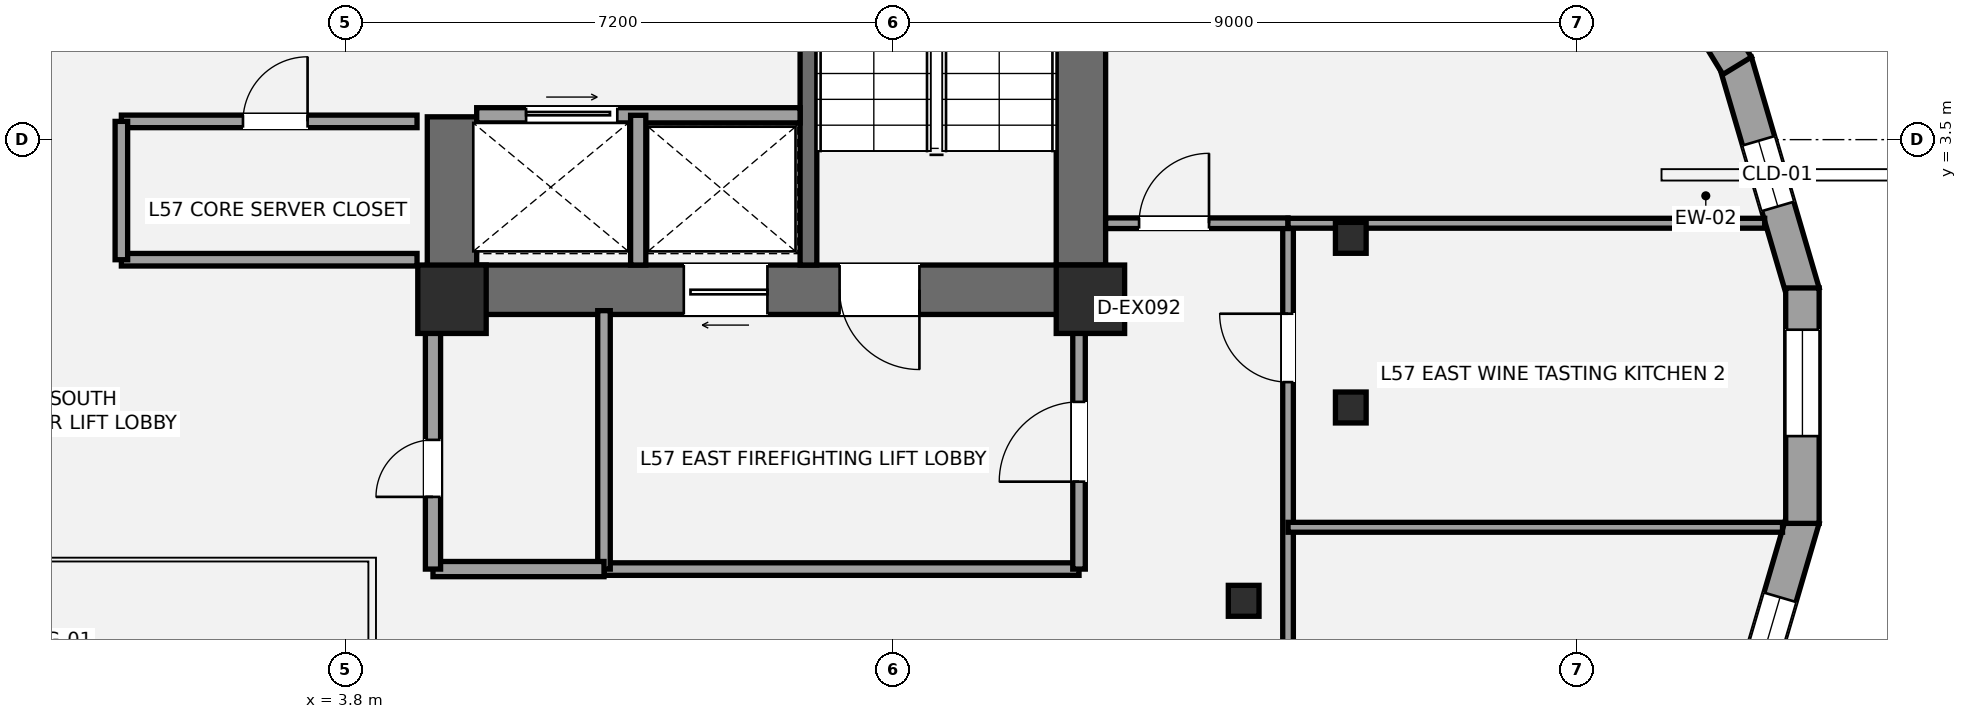
"""IFC4 building model, lengths in metres.
Left out: names, types, materials, properties, quantities, classifications, styles, units other than length and angle.
Written with IfcOpenShell. Run it as: python <this file> out.ifc"""

import sys

from ifc_helpers import new_model, si_unit, direction, frame, frame_2d, origin, origin_2d, place, context, subcontext, project, spatial, rectangle, i_section, extrude, element, fill, save


model = new_model("IFC4")
c1 = context("Model", 3, precision=1e-05, world=origin(), true_north=direction((0.0, 1.0)))
c2 = subcontext(c1, "Body", "Model", "MODEL_VIEW")
j1 = project(units=[si_unit("LENGTHUNIT", "METRE"), si_unit("PLANEANGLEUNIT", "RADIAN")], contexts=[c1])
p1 = place(None, origin())
s1 = spatial("IfcSite", under=j1, at=p1, CompositionType="ELEMENT")
p2 = place(p1, origin())
s2 = spatial("IfcBuilding", under=s1, at=p2, CompositionType="ELEMENT")
p3 = place(p2, frame((0.0, 0.0, 205.9)))
s3 = spatial("IfcBuildingStorey", under=s2, at=p3, CompositionType="ELEMENT", Elevation=205.9)
p4 = place(p3, frame((13.475, 1.2, 0.0), z_axis=(0.0, 0.0, 1.0), x_axis=(0.0, 1.0, 0.0)))
e1 = element("IfcWall", 1, at=p4, inside=s3, PredefinedType="SHEAR", context=c2, shape_type="SweptSolid", body=[
    extrude(rectangle(XDim=8.45, YDim=0.65, at=frame_2d((4.225, 0.0))), origin(), (0.0, 0.0, 1.0), 4.1),
])
p5 = place(p3, frame((13.8, 1.525, 0.0), z_axis=(0.0, 0.0, 1.0), x_axis=(-1.0, 0.0, 0.0)))
e2 = element("IfcWall", 2, at=p5, inside=s3, PredefinedType="SHEAR", context=c2, shape_type="SweptSolid", body=[
    extrude(rectangle(XDim=8.925, YDim=0.65, at=frame_2d((4.462, 0.0))), origin(), (0.0, 0.0, 1.0), 4.1),
])
p6 = place(p5, frame((2.45, 0.0, 0.0)))
e3 = element("IfcOpeningElement", 3, at=p6, cuts=e2, PredefinedType="OPENING", context=c2, shape_type="SweptSolid", body=[
    extrude(rectangle(XDim=1.05, YDim=2.15, at=frame_2d((0.525, 1.075))), frame((0.0, 0.335, 0.0), z_axis=(0.0, -1.0, 0.0), x_axis=(1.0, 0.0, 0.0)), (0.0, 0.0, 1.0), 0.67),
])
p7 = place(p5, frame((4.45, 0.0, 0.0)))
e4 = element("IfcOpeningElement", 4, at=p7, cuts=e2, PredefinedType="OPENING", context=c2, shape_type="SweptSolid", body=[
    extrude(rectangle(XDim=1.1, YDim=2.2, at=frame_2d((0.55, 1.1))), frame((0.0, 0.335, 0.0), z_axis=(0.0, -1.0, 0.0), x_axis=(1.0, 0.0, 0.0)), (0.0, 0.0, 1.0), 0.67),
])
p8 = place(p3, frame((5.2, 1.2, 0.0), z_axis=(0.0, 0.0, 1.0), x_axis=(0.0, 1.0, 0.0)))
e5 = element("IfcWall", 5, at=p8, inside=s3, PredefinedType="SHEAR", context=c2, shape_type="SweptSolid", body=[
    extrude(rectangle(XDim=2.6, YDim=0.65, at=frame_2d((1.3, 0.0))), origin(), (0.0, 0.0, 1.0), 4.1),
])
p9 = place(p3, frame((9.89, 1.85, 0.0), z_axis=(0.0, 0.0, 1.0), x_axis=(0.0, 1.0, 0.0)))
e6 = element("IfcWall", 6, at=p9, inside=s3, PredefinedType="SHEAR", context=c2, shape_type="SweptSolid", body=[
    extrude(rectangle(XDim=7.15, YDim=0.22, at=frame_2d((3.575, 0.0))), origin(), (0.0, 0.0, 1.0), 4.1),
])
for number, where, z_axis, x_axis in (
    (7, (5.2, 1.4, 0.0), (0.0, 0.0, 1.0), (1.0, 0.0, 0.0)),
    (8, (13.6, 1.4, 0.0), (0.0, 0.0, 1.0), (1.0, 0.0, 0.0)),
):
    element("IfcColumn", number, at=place(p3, frame(where, z_axis=z_axis, x_axis=x_axis)), inside=s3, PredefinedType="COLUMN", context=c2, shape_type="SweptSolid", body=[
        extrude(rectangle(XDim=0.9, YDim=0.9, at=origin_2d()), origin(), (0.0, 0.0, 1.0), 4.1),
    ])
for number, where, z_axis, x_axis in (
    (9, (17.026, 2.208, 0.0), (0.0, 0.0, 1.0), (1.0, 0.0, 0.0)),
    (10, (15.616, -2.567, 0.0), (0.0, 0.0, 1.0), (1.0, 0.0, 0.0)),
    (11, (17.026, -0.024, 0.0), (0.0, 0.0, 1.0), (1.0, 0.0, 0.0)),
):
    element("IfcColumn", number, at=place(p3, frame(where, z_axis=z_axis, x_axis=x_axis)), inside=s3, PredefinedType="COLUMN", context=c2, shape_type="SweptSolid", body=[
        extrude(i_section(OverallWidth=0.404, OverallDepth=0.407, WebThickness=0.027, FlangeThickness=0.044, at=origin_2d()), origin(), (0.0, 0.0, 1.0), 4.1),
    ])
p10 = place(p3, frame((22.086, 4.525, 0.0), z_axis=(0.0, 0.0, 1.0), x_axis=(0.281477355005, -0.959567870773, 0.0)))
e12 = element("IfcWall", 12, at=p10, inside=s3, PredefinedType="STANDARD", context=c2, shape_type="SweptSolid", body=[
    extrude(rectangle(XDim=3.166, YDim=0.44, at=frame_2d((1.583, 0.0))), origin(), (0.0, 0.0, 1.0), 3.215),
])
p11 = place(p10, frame((1.084, 0.0, 0.42)))
e13 = element("IfcOpeningElement", 13, at=p11, cuts=e12, PredefinedType="OPENING", context=c2, shape_type="SweptSolid", body=[
    extrude(rectangle(XDim=0.9, YDim=1.35, at=frame_2d((0.45, 0.675))), frame((0.0, 0.23, 0.0), z_axis=(0.0, -1.0, 0.0), x_axis=(1.0, 0.0, 0.0)), (0.0, 0.0, 1.0), 0.46),
])
p12 = place(p3, frame((20.361, 7.333, 0.0), z_axis=(0.0, 0.0, 1.0), x_axis=(0.521214394333, -0.853425775999, 0.0)))
e14 = element("IfcWall", 14, at=p12, inside=s3, PredefinedType="STANDARD", context=c2, shape_type="SweptSolid", body=[
    extrude(rectangle(XDim=3.353, YDim=0.44, at=frame_2d((1.677, 0.0))), origin(), (0.0, 0.0, 1.0), 3.215),
])
p13 = place(p12, frame((0.734, 0.0, 0.58)))
e15 = element("IfcOpeningElement", 15, at=p13, cuts=e14, PredefinedType="OPENING", context=c2, shape_type="SweptSolid", body=[
    extrude(rectangle(XDim=1.4, YDim=1.55, at=frame_2d((0.7, 0.775))), frame((0.0, 0.23, 0.0), z_axis=(0.0, -1.0, 0.0), x_axis=(1.0, 0.0, 0.0)), (0.0, 0.0, 1.0), 0.46),
])
p14 = place(p3, frame((22.977, -1.487, 0.0), z_axis=(0.0, 0.0, 1.0), x_axis=(-0.281477355005, -0.959567870773, 0.0)))
e16 = element("IfcWall", 16, at=p14, inside=s3, PredefinedType="STANDARD", context=c2, shape_type="SweptSolid", body=[
    extrude(rectangle(XDim=3.166, YDim=0.44, at=frame_2d((1.583, 0.0))), origin(), (0.0, 0.0, 1.0), 3.215),
])
p15 = place(p14, frame((1.078, 0.0, 0.58)))
e17 = element("IfcOpeningElement", 17, at=p15, cuts=e16, PredefinedType="OPENING", context=c2, shape_type="SweptSolid", body=[
    extrude(rectangle(XDim=1.4, YDim=1.55, at=frame_2d((0.7, 0.775))), frame((0.0, 0.23, 0.0), z_axis=(0.0, -1.0, 0.0), x_axis=(1.0, 0.0, 0.0)), (0.0, 0.0, 1.0), 0.46),
])
p16 = place(p3, frame((22.968, 1.549, 0.0), z_axis=(0.0, 0.0, 1.0), x_axis=(0.0, -1.0, 0.0)))
e18 = element("IfcWall", 18, at=p16, inside=s3, PredefinedType="STANDARD", context=c2, shape_type="SweptSolid", body=[
    extrude(rectangle(XDim=3.097, YDim=0.44, at=frame_2d((1.549, 0.0))), origin(), (0.0, 0.0, 1.0), 3.219),
])
p17 = place(p16, frame((0.549, 0.0, 0.58)))
e19 = element("IfcOpeningElement", 19, at=p17, cuts=e18, PredefinedType="OPENING", context=c2, shape_type="SweptSolid", body=[
    extrude(rectangle(XDim=1.4, YDim=1.55, at=frame_2d((0.7, 0.775))), frame((0.0, 0.23, 0.0), z_axis=(0.0, -1.0, 0.0), x_axis=(1.0, 0.0, 0.0)), (0.0, 0.0, 1.0), 0.46),
])
p18 = place(p3, frame((7.2, -2.15, 0.0), z_axis=(0.0, 0.0, 1.0), x_axis=(1.0, 0.0, 0.0)))
e20 = element("IfcWall", 20, at=p18, inside=s3, PredefinedType="PARTITIONING", context=c2, shape_type="SweptSolid", body=[
    extrude(rectangle(XDim=6.25, YDim=0.165, at=frame_2d((3.125, 0.0))), origin(), (0.0, 0.0, 1.0), 3.92),
])
p19 = place(p3, frame((7.2, -2.15, 0.0), z_axis=(0.0, 0.0, 1.0), x_axis=(0.0, 1.0, 0.0)))
e21 = element("IfcWall", 21, at=p19, inside=s3, PredefinedType="PARTITIONING", context=c2, shape_type="SweptSolid", body=[
    extrude(rectangle(XDim=3.4, YDim=0.165, at=frame_2d((1.7, 0.0))), origin(), (0.0, 0.0, 1.0), 3.373),
])
p20 = place(p3, frame((13.45, -2.15, 0.0), z_axis=(0.0, 0.0, 1.0), x_axis=(0.0, 1.0, 0.0)))
e22 = element("IfcWall", 22, at=p20, inside=s3, PredefinedType="PARTITIONING", context=c2, shape_type="SweptSolid", body=[
    extrude(rectangle(XDim=3.4, YDim=0.165, at=frame_2d((1.7, 0.0))), origin(), (0.0, 0.0, 1.0), 3.92),
])
p21 = place(p20, frame((1.15, 0.0, 0.0)))
e23 = element("IfcOpeningElement", 23, at=p21, cuts=e22, PredefinedType="OPENING", context=c2, shape_type="SweptSolid", body=[
    extrude(rectangle(XDim=1.05, YDim=2.15, at=frame_2d((0.525, 1.075))), frame((0.0, 0.093, 0.0), z_axis=(0.0, -1.0, 0.0), x_axis=(1.0, 0.0, 0.0)), (0.0, 0.0, 1.0), 0.185),
])
p22 = place(p3, frame((4.95, -2.15, 0.0), z_axis=(0.0, 0.0, 1.0), x_axis=(1.0, 0.0, 0.0)))
e24 = element("IfcWall", 24, at=p22, inside=s3, PredefinedType="SOLIDWALL", context=c2, shape_type="SweptSolid", body=[
    extrude(rectangle(XDim=2.25, YDim=0.2, at=frame_2d((1.125, 0.0))), origin(), (0.0, 0.0, 1.0), 3.92),
])
p23 = place(p3, frame((4.95, -2.15, 0.0), z_axis=(0.0, 0.0, 1.0), x_axis=(0.0, 1.0, 0.0)))
e25 = element("IfcWall", 25, at=p23, inside=s3, PredefinedType="SOLIDWALL", context=c2, shape_type="SweptSolid", body=[
    extrude(rectangle(XDim=3.4, YDim=0.2, at=frame_2d((1.7, 0.0))), origin(), (0.0, 0.0, 1.0), 3.373),
])
p24 = place(p23, frame((0.95, 0.0, 0.0)))
e26 = element("IfcOpeningElement", 26, at=p24, cuts=e25, PredefinedType="OPENING", context=c2, shape_type="SweptSolid", body=[
    extrude(rectangle(XDim=0.75, YDim=2.1, at=frame_2d((0.375, 1.05))), frame((0.0, 0.11, 0.0), z_axis=(0.0, -1.0, 0.0), x_axis=(1.0, 0.0, 0.0)), (0.0, 0.0, 1.0), 0.22),
])
p25 = place(p3, frame((5.525, 3.82, 0.0), z_axis=(0.0, 0.0, 1.0), x_axis=(1.0, 0.0, 0.0)))
e27 = element("IfcWall", 27, at=p25, inside=s3, PredefinedType="SOLIDWALL", context=c2, shape_type="SweptSolid", body=[
    extrude(rectangle(XDim=4.255, YDim=0.2, at=frame_2d((2.127, 0.0))), origin(), (0.0, 0.0, 1.0), 3.92),
])
p26 = place(p25, frame((0.65, 0.0, 0.0)))
e28 = element("IfcOpeningElement", 28, at=p26, cuts=e27, PredefinedType="OPENING", context=c2, shape_type="SweptSolid", body=[
    extrude(rectangle(XDim=1.2, YDim=2.2, at=frame_2d((0.6, 1.1))), frame((0.0, 0.11, 0.0), z_axis=(0.0, -1.0, 0.0), x_axis=(1.0, 0.0, 0.0)), (0.0, 0.0, 1.0), 0.22),
])
p27 = place(p3, frame((7.65, 1.85, 0.0), z_axis=(0.0, 0.0, 1.0), x_axis=(0.0, 1.0, 0.0)))
e29 = element("IfcWall", 29, at=p27, inside=s3, PredefinedType="SOLIDWALL", context=c2, shape_type="SweptSolid", body=[
    extrude(rectangle(XDim=1.97, YDim=0.2, at=frame_2d((0.985, 0.0))), origin(), (0.0, 0.0, 1.0), 3.92),
])
p28 = place(p3, frame((0.85, 1.92, 0.0), z_axis=(0.0, 0.0, 1.0), x_axis=(1.0, 0.0, 0.0)))
e30 = element("IfcWall", 30, at=p28, inside=s3, PredefinedType="PARTITIONING", context=c2, shape_type="SweptSolid", body=[
    extrude(rectangle(XDim=3.89, YDim=0.165, at=frame_2d((1.945, 0.0))), origin(), (0.0, 0.0, 1.0), 3.06),
])
p29 = place(p3, frame((0.85, 3.74, 0.0), z_axis=(0.0, 0.0, 1.0), x_axis=(1.0, 0.0, 0.0)))
e31 = element("IfcWall", 31, at=p29, inside=s3, PredefinedType="PARTITIONING", context=c2, shape_type="SweptSolid", body=[
    extrude(rectangle(XDim=3.89, YDim=0.165, at=frame_2d((1.945, 0.0))), origin(), (0.0, 0.0, 1.0), 3.92),
])
p30 = place(p29, frame((1.6, 0.0, 0.0)))
e32 = element("IfcOpeningElement", 32, at=p30, cuts=e31, PredefinedType="OPENING", context=c2, shape_type="SweptSolid", body=[
    extrude(rectangle(XDim=0.85, YDim=2.1, at=frame_2d((0.425, 1.05))), frame((0.0, 0.093, 0.0), z_axis=(0.0, -1.0, 0.0), x_axis=(1.0, 0.0, 0.0)), (0.0, 0.0, 1.0), 0.185),
])
p31 = place(p3, frame((0.85, 1.92, 0.0), z_axis=(0.0, 0.0, 1.0), x_axis=(0.0, 1.0, 0.0)))
e33 = element("IfcWall", 33, at=p31, inside=s3, PredefinedType="PARTITIONING", context=c2, shape_type="SweptSolid", body=[
    extrude(rectangle(XDim=1.82, YDim=0.165, at=frame_2d((0.91, 0.0))), origin(), (0.0, 0.0, 1.0), 3.92),
])
p32 = place(p3, frame((16.2, -7.537, 0.0), z_axis=(0.0, 0.0, 1.0), x_axis=(0.0, 1.0, 0.0)))
e34 = element("IfcWall", 34, at=p32, inside=s3, PredefinedType="PARTITIONING", context=c2, shape_type="SweptSolid", body=[
    extrude(rectangle(XDim=9.937, YDim=0.14, at=frame_2d((4.968, 0.0))), origin(), (0.0, 0.0, 1.0), 3.307),
])
p33 = place(p32, frame((3.011, 0.0, 0.0)))
e35 = element("IfcOpeningElement", 35, at=p33, cuts=e34, PredefinedType="OPENING", context=c2, shape_type="SweptSolid", body=[
    extrude(rectangle(XDim=0.9, YDim=2.1, at=frame_2d((0.45, 1.05))), frame((0.0, 0.08, 0.0), z_axis=(0.0, -1.0, 0.0), x_axis=(1.0, 0.0, 0.0)), (0.0, 0.0, 1.0), 0.16),
])
p34 = place(p32, frame((7.846, 0.0, 0.0)))
e36 = element("IfcOpeningElement", 36, at=p34, cuts=e34, PredefinedType="OPENING", context=c2, shape_type="SweptSolid", body=[
    extrude(rectangle(XDim=0.9, YDim=2.1, at=frame_2d((0.45, 1.05))), frame((0.0, 0.08, 0.0), z_axis=(0.0, -1.0, 0.0), x_axis=(1.0, 0.0, 0.0)), (0.0, 0.0, 1.0), 0.16),
])
p35 = place(p3, frame((13.8, 2.4, 0.0), z_axis=(0.0, 0.0, 1.0), x_axis=(1.0, 0.0, 0.0)))
e37 = element("IfcWall", 37, at=p35, inside=s3, PredefinedType="PARTITIONING", context=c2, shape_type="SweptSolid", body=[
    extrude(rectangle(XDim=2.4, YDim=0.14, at=frame_2d((1.2, 0.0))), origin(), (0.0, 0.0, 1.0), 3.92),
])
p36 = place(p35, frame((0.44, 0.0, 0.0)))
e38 = element("IfcOpeningElement", 38, at=p36, cuts=e37, PredefinedType="OPENING", context=c2, shape_type="SweptSolid", body=[
    extrude(rectangle(XDim=0.92, YDim=2.15, at=frame_2d((0.46, 1.075))), frame((0.0, 0.08, 0.0), z_axis=(0.0, -1.0, 0.0), x_axis=(1.0, 0.0, 0.0)), (0.0, 0.0, 1.0), 0.16),
])
p37 = place(p3, frame((16.2, 2.4, 0.0), z_axis=(0.0, 0.0, 1.0), x_axis=(1.0, 0.0, 0.0)))
e39 = element("IfcWall", 39, at=p37, inside=s3, PredefinedType="PARTITIONING", context=c2, shape_type="SweptSolid", body=[
    extrude(rectangle(XDim=6.271, YDim=0.13, at=frame_2d((3.136, 0.0))), origin(), (0.0, 0.0, 1.0), 3.373),
])
p38 = place(p3, frame((16.2, -1.6, 0.0), z_axis=(0.0, 0.0, 1.0), x_axis=(1.0, 0.0, 0.0)))
e40 = element("IfcWall", 40, at=p38, inside=s3, PredefinedType="PARTITIONING", context=c2, shape_type="SweptSolid", body=[
    extrude(rectangle(XDim=6.506, YDim=0.13, at=frame_2d((3.253, 0.0))), origin(), (0.0, 0.0, 1.0), 3.373),
])
p39 = place(p11, origin())
e41 = element("IfcWindow", 41, at=p39, inside=s3, PartitioningType="SINGLE_PANEL", PredefinedType="WINDOW", context=c2, shape_type="SweptSolid", body=[
    extrude(rectangle(XDim=0.9, YDim=1.35, at=frame_2d((0.45, 0.675))), frame((0.0, -0.01, 0.0), z_axis=(0.0, -1.0, 0.0), x_axis=(1.0, 0.0, 0.0)), (0.0, 0.0, 1.0), 0.06),
])
fill(e13, e41)
p40 = place(p15, origin())
e42 = element("IfcWindow", 42, at=p40, inside=s3, PartitioningType="SINGLE_PANEL", PredefinedType="WINDOW", context=c2, shape_type="SweptSolid", body=[
    extrude(rectangle(XDim=1.4, YDim=1.55, at=frame_2d((0.7, 0.775))), frame((0.0, -0.01, 0.0), z_axis=(0.0, -1.0, 0.0), x_axis=(1.0, 0.0, 0.0)), (0.0, 0.0, 1.0), 0.06),
])
fill(e17, e42)
p41 = place(p17, origin())
e43 = element("IfcWindow", 43, at=p41, inside=s3, PartitioningType="SINGLE_PANEL", PredefinedType="WINDOW", context=c2, shape_type="SweptSolid", body=[
    extrude(rectangle(XDim=1.4, YDim=1.55, at=frame_2d((0.7, 0.775))), frame((0.0, -0.01, 0.0), z_axis=(0.0, -1.0, 0.0), x_axis=(1.0, 0.0, 0.0)), (0.0, 0.0, 1.0), 0.06),
])
fill(e19, e43)
p42 = place(p6, origin())
e44 = element("IfcDoor", 44, at=p42, inside=s3, OperationType="SINGLE_SWING_LEFT", PredefinedType="DOOR", context=c2, shape_type="SweptSolid", body=[
    extrude(rectangle(XDim=1.05, YDim=2.15, at=frame_2d((0.525, 1.075))), frame((0.0, 0.025, 0.0), z_axis=(0.0, -1.0, 0.0), x_axis=(1.0, 0.0, 0.0)), (0.0, 0.0, 1.0), 0.05),
])
fill(e3, e44)
p43 = place(p21, origin())
e45 = element("IfcDoor", 45, at=p43, inside=s3, OperationType="SINGLE_SWING_LEFT", PredefinedType="DOOR", context=c2, shape_type="SweptSolid", body=[
    extrude(rectangle(XDim=1.05, YDim=2.15, at=frame_2d((0.525, 1.075))), frame((0.0, 0.025, 0.0), z_axis=(0.0, -1.0, 0.0), x_axis=(1.0, 0.0, 0.0)), (0.0, 0.0, 1.0), 0.05),
])
fill(e23, e45)
p44 = place(p24, origin())
e46 = element("IfcDoor", 46, at=p44, inside=s3, OperationType="SINGLE_SWING_LEFT", PredefinedType="DOOR", context=c2, shape_type="SweptSolid", body=[
    extrude(rectangle(XDim=0.75, YDim=2.1, at=frame_2d((0.375, 1.05))), frame((0.0, 0.025, 0.0), z_axis=(0.0, -1.0, 0.0), x_axis=(1.0, 0.0, 0.0)), (0.0, 0.0, 1.0), 0.05),
])
fill(e26, e46)
p45 = place(p7, origin())
e47 = element("IfcDoor", 47, at=p45, inside=s3, OperationType="SLIDING_TO_LEFT", PredefinedType="DOOR", context=c2, shape_type="SweptSolid", body=[
    extrude(rectangle(XDim=1.1, YDim=2.2, at=frame_2d((0.55, 1.1))), frame((0.0, 0.025, 0.0), z_axis=(0.0, -1.0, 0.0), x_axis=(1.0, 0.0, 0.0)), (0.0, 0.0, 1.0), 0.05),
])
fill(e4, e47)
p46 = place(p26, origin())
e48 = element("IfcDoor", 48, at=p46, inside=s3, OperationType="SLIDING_TO_RIGHT", PredefinedType="DOOR", context=c2, shape_type="SweptSolid", body=[
    extrude(rectangle(XDim=1.2, YDim=2.2, at=frame_2d((0.6, 1.1))), frame((0.0, 0.025, 0.0), z_axis=(0.0, -1.0, 0.0), x_axis=(1.0, 0.0, 0.0)), (0.0, 0.0, 1.0), 0.05),
])
fill(e28, e48)
p47 = place(p30, origin())
e49 = element("IfcDoor", 49, at=p47, inside=s3, OperationType="SINGLE_SWING_RIGHT", PredefinedType="DOOR", context=c2, shape_type="SweptSolid", body=[
    extrude(rectangle(XDim=0.85, YDim=2.1, at=frame_2d((0.425, 1.05))), frame((0.0, 0.025, 0.0), z_axis=(0.0, -1.0, 0.0), x_axis=(1.0, 0.0, 0.0)), (0.0, 0.0, 1.0), 0.05),
])
fill(e32, e49)
p48 = place(p36, origin())
e50 = element("IfcDoor", 50, at=p48, inside=s3, OperationType="SINGLE_SWING_RIGHT", PredefinedType="DOOR", context=c2, shape_type="SweptSolid", body=[
    extrude(rectangle(XDim=0.92, YDim=2.15, at=frame_2d((0.46, 1.075))), frame((0.0, 0.025, 0.0), z_axis=(0.0, -1.0, 0.0), x_axis=(1.0, 0.0, 0.0)), (0.0, 0.0, 1.0), 0.05),
])
fill(e38, e50)
p49 = place(p34, origin())
e51 = element("IfcDoor", 51, at=p49, inside=s3, OperationType="SINGLE_SWING_RIGHT", PredefinedType="DOOR", context=c2, shape_type="SweptSolid", body=[
    extrude(rectangle(XDim=0.9, YDim=2.1, at=frame_2d((0.45, 1.05))), frame((0.0, 0.025, 0.0), z_axis=(0.0, -1.0, 0.0), x_axis=(1.0, 0.0, 0.0)), (0.0, 0.0, 1.0), 0.05),
])
fill(e36, e51)
save(model, sys.argv[1])
